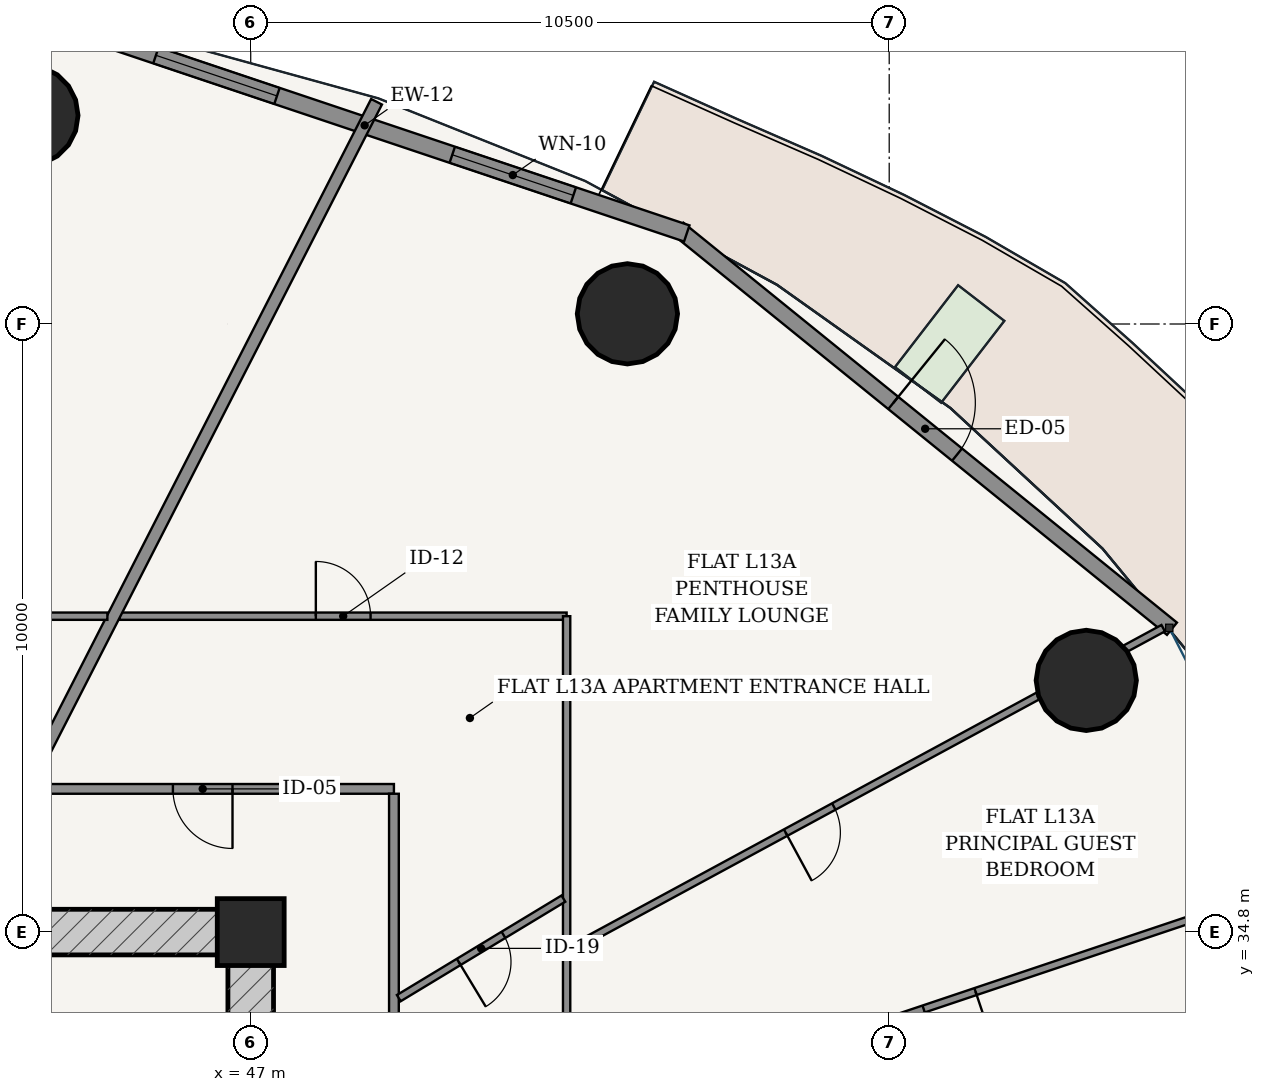
"""IFC4 building model, lengths in metres.
Left out: names, types, materials, properties, quantities, classifications, styles, units other than length and angle.
Written with IfcOpenShell. Run it as: python <this file> out.ifc"""

import sys

from ifc_helpers import new_model, si_unit, direction, frame, frame_2d, origin, origin_2d, place, context, subcontext, project, spatial, rectangle, hollow_circle, extrude, source, transform, mapped, element, fill, save


model = new_model("IFC4")
c1 = context("Model", 3, precision=1e-05, world=origin(), true_north=direction((-0.2419218956, 0.970295726276)))
c2 = subcontext(c1, "Body", "Model", "MODEL_VIEW")
j1 = project(units=[si_unit("LENGTHUNIT", "METRE"), si_unit("PLANEANGLEUNIT", "RADIAN")], contexts=[c1])
p1 = place(None, origin())
s1 = spatial("IfcSite", under=j1, at=p1, CompositionType="ELEMENT")
p2 = place(p1, origin())
s2 = spatial("IfcBuilding", under=s1, at=p2, CompositionType="ELEMENT")
p3 = place(p2, frame((0.0, 0.0, 52.8)))
s3 = spatial("IfcBuildingStorey", under=s2, at=p3, CompositionType="ELEMENT", Elevation=52.8)
p4 = place(p3, frame((47.0, 34.8, 0.0), z_axis=(0.0, 0.0, 1.0), x_axis=(1.0, 0.0, 0.0)))
e1 = element("IfcColumn", 1, at=p4, inside=s3, PredefinedType="COLUMN", context=c2, shape_type="SweptSolid", body=[
    extrude(rectangle(XDim=1.1, YDim=1.1, at=origin_2d()), origin(), (0.0, 0.0, 1.0), 3.6),
])
p5 = place(p3, frame((28.625, 34.8, 0.0), z_axis=(0.0, 0.0, 1.0), x_axis=(1.0, 0.0, 0.0)))
e2 = element("IfcWall", 2, at=p5, inside=s3, PredefinedType="SHEAR", context=c2, shape_type="SweptSolid", body=[
    extrude(rectangle(XDim=18.75, YDim=0.75, at=frame_2d((9.375, 0.0))), origin(), (0.0, 0.0, 1.0), 3.32),
])
p6 = place(p5, frame((6.887, 0.0, 0.0)))
e3 = element("IfcOpeningElement", 3, at=p6, cuts=e2, PredefinedType="OPENING", context=c2, shape_type="SweptSolid", body=[
    extrude(rectangle(XDim=0.85, YDim=2.1, at=frame_2d((0.425, 1.05))), frame((0.0, 0.385, 0.0), z_axis=(0.0, -1.0, 0.0), x_axis=(1.0, 0.0, 0.0)), (0.0, 0.0, 1.0), 0.77),
])
p7 = place(p5, frame((8.945, 0.0, 0.0)))
e4 = element("IfcOpeningElement", 4, at=p7, cuts=e2, PredefinedType="OPENING", context=c2, shape_type="SweptSolid", body=[
    extrude(rectangle(XDim=0.86, YDim=2.1, at=frame_2d((0.43, 1.05))), frame((0.0, 0.385, 0.0), z_axis=(0.0, -1.0, 0.0), x_axis=(1.0, 0.0, 0.0)), (0.0, 0.0, 1.0), 0.77),
])
p8 = place(p5, frame((11.012, 0.0, 0.0)))
e5 = element("IfcOpeningElement", 5, at=p8, cuts=e2, PredefinedType="OPENING", context=c2, shape_type="SweptSolid", body=[
    extrude(rectangle(XDim=0.85, YDim=2.1, at=frame_2d((0.425, 1.05))), frame((0.0, 0.385, 0.0), z_axis=(0.0, -1.0, 0.0), x_axis=(1.0, 0.0, 0.0)), (0.0, 0.0, 1.0), 0.77),
])
p9 = place(p3, frame((47.0, 19.175, 0.0), z_axis=(0.0, 0.0, 1.0), x_axis=(0.0, 1.0, 0.0)))
e6 = element("IfcWall", 6, at=p9, inside=s3, PredefinedType="SHEAR", context=c2, shape_type="SweptSolid", body=[
    extrude(rectangle(XDim=15.25, YDim=0.75, at=frame_2d((7.625, 0.0))), origin(), (0.0, 0.0, 1.0), 3.32),
])
p10 = place(p9, frame((9.875, 0.0, 0.0)))
e7 = element("IfcOpeningElement", 7, at=p10, cuts=e6, PredefinedType="OPENING", context=c2, shape_type="SweptSolid", body=[
    extrude(rectangle(XDim=1.5, YDim=2.2, at=frame_2d((0.75, 1.1))), frame((0.0, 0.385, 0.0), z_axis=(0.0, -1.0, 0.0), x_axis=(1.0, 0.0, 0.0)), (0.0, 0.0, 1.0), 0.77),
])
for number, where, z_axis, x_axis in (
    (8, (60.741, 38.939, 0.0), (0.0, 0.0, 1.0), (1.0, 0.0, 0.0)),
    (9, (53.195, 44.968, 0.0), (0.0, 0.0, 1.0), (1.0, 0.0, 0.0)),
    (10, (43.336, 48.23, 0.0), (0.0, 0.0, 1.0), (1.0, 0.0, 0.0)),
):
    element("IfcColumn", number, at=place(p3, frame(where, z_axis=z_axis, x_axis=x_axis)), inside=s3, PredefinedType="COLUMN", context=c2, shape_type="SweptSolid", body=[
        extrude(hollow_circle(Radius=0.825, WallThickness=0.05, at=origin_2d()), origin(), (0.0, 0.0, 1.0), 3.6),
    ])
p11 = place(p3, frame((62.15, 39.789, 0.0), z_axis=(0.0, 0.0, 1.0), x_axis=(-0.777005352078, 0.62949398952, 0.0)))
e11 = element("IfcWall", 11, at=p11, inside=s3, PredefinedType="SOLIDWALL", context=c2, shape_type="SweptSolid", body=[
    extrude(rectangle(XDim=10.447, YDim=0.26, at=frame_2d((5.223, 0.0))), origin(), (0.0, 0.0, 1.0), 3.32),
])
p12 = place(p11, frame((4.548, 0.0, 0.0)))
e12 = element("IfcOpeningElement", 12, at=p12, cuts=e11, PredefinedType="OPENING", context=c2, shape_type="SweptSolid", body=[
    extrude(rectangle(XDim=1.35, YDim=2.2, at=frame_2d((0.675, 1.1))), frame((0.0, 0.14, 0.0), z_axis=(0.0, -1.0, 0.0), x_axis=(1.0, 0.0, 0.0)), (0.0, 0.0, 1.0), 0.28),
])
p13 = place(p3, frame((54.171, 46.289, 0.0), z_axis=(0.0, 0.0, 1.0), x_axis=(-0.948041258496, 0.318147406385, 0.0)))
e13 = element("IfcWall", 13, at=p13, inside=s3, PredefinedType="SOLIDWALL", context=c2, shape_type="SweptSolid", body=[
    extrude(rectangle(XDim=11.175, YDim=0.28, at=frame_2d((5.588, 0.0))), origin(), (0.0, 0.0, 1.0), 3.32),
])
p14 = place(p13, frame((1.967, 0.0, 0.85)))
e14 = element("IfcOpeningElement", 14, at=p14, cuts=e13, PredefinedType="OPENING", context=c2, shape_type="SweptSolid", body=[
    extrude(rectangle(XDim=2.1, YDim=1.95, at=frame_2d((1.05, 0.975))), frame((0.0, 0.15, 0.0), z_axis=(0.0, -1.0, 0.0), x_axis=(1.0, 0.0, 0.0)), (0.0, 0.0, 1.0), 0.3),
])
p15 = place(p13, frame((7.108, 0.0, 0.85)))
e15 = element("IfcOpeningElement", 15, at=p15, cuts=e13, PredefinedType="OPENING", context=c2, shape_type="SweptSolid", body=[
    extrude(rectangle(XDim=2.1, YDim=1.95, at=frame_2d((1.05, 0.975))), frame((0.0, 0.15, 0.0), z_axis=(0.0, -1.0, 0.0), x_axis=(1.0, 0.0, 0.0)), (0.0, 0.0, 1.0), 0.3),
])
p16 = place(p3, frame((26.645, 37.155, 0.0), z_axis=(0.0, 0.0, 1.0), x_axis=(1.0, 0.0, 0.0)))
e16 = element("IfcWall", 16, at=p16, inside=s3, PredefinedType="PARTITIONING", context=c2, shape_type="SweptSolid", body=[
    extrude(rectangle(XDim=22.71, YDim=0.16, at=frame_2d((11.355, 0.0))), origin(), (0.0, 0.0, 1.0), 2.688),
])
p17 = place(p16, frame((19.075, 0.0, 0.0)))
e17 = element("IfcOpeningElement", 17, at=p17, cuts=e16, PredefinedType="OPENING", context=c2, shape_type="SweptSolid", body=[
    extrude(rectangle(XDim=0.98, YDim=2.2, at=frame_2d((0.49, 1.1))), frame((0.0, 0.09, 0.0), z_axis=(0.0, -1.0, 0.0), x_axis=(1.0, 0.0, 0.0)), (0.0, 0.0, 1.0), 0.18),
])
p18 = place(p16, frame((6.221, 0.0, 0.0)))
e18 = element("IfcOpeningElement", 18, at=p18, cuts=e16, PredefinedType="OPENING", context=c2, shape_type="SweptSolid", body=[
    extrude(rectangle(XDim=0.98, YDim=2.2, at=frame_2d((0.49, 1.1))), frame((0.0, 0.09, 0.0), z_axis=(0.0, -1.0, 0.0), x_axis=(1.0, 0.0, 0.0)), (0.0, 0.0, 1.0), 0.18),
])
p19 = place(p3, frame((49.355, 16.525, 0.0), z_axis=(0.0, 0.0, 1.0), x_axis=(0.0, 1.0, 0.0)))
e19 = element("IfcWall", 19, at=p19, inside=s3, PredefinedType="PARTITIONING", context=c2, shape_type="SweptSolid", body=[
    extrude(rectangle(XDim=20.55, YDim=0.16, at=frame_2d((10.275, 0.0))), origin(), (0.0, 0.0, 1.0), 2.688),
])
p20 = place(p3, frame((44.847, 39.995, 0.0), z_axis=(0.0, 0.0, 1.0), x_axis=(1.0, 0.0, 0.0)))
e20 = element("IfcWall", 20, at=p20, inside=s3, PredefinedType="PARTITIONING", context=c2, shape_type="SweptSolid", body=[
    extrude(rectangle(XDim=7.348, YDim=0.12, at=frame_2d((3.674, 0.0))), origin(), (0.0, 0.0, 1.0), 2.688),
])
p21 = place(p20, frame((3.224, 0.0, 0.0)))
e21 = element("IfcOpeningElement", 21, at=p21, cuts=e20, PredefinedType="OPENING", context=c2, shape_type="SweptSolid", body=[
    extrude(rectangle(XDim=0.9, YDim=2.15, at=frame_2d((0.45, 1.075))), frame((0.0, 0.07, 0.0), z_axis=(0.0, -1.0, 0.0), x_axis=(1.0, 0.0, 0.0)), (0.0, 0.0, 1.0), 0.14),
])
p22 = place(p3, frame((52.195, 39.995, 0.0), z_axis=(0.0, 0.0, 1.0), x_axis=(0.0, -1.0, 0.0)))
e22 = element("IfcWall", 22, at=p22, inside=s3, PredefinedType="PARTITIONING", context=c2, shape_type="SweptSolid", body=[
    extrude(rectangle(XDim=20.779, YDim=0.12, at=frame_2d((10.39, 0.0))), origin(), (0.0, 0.0, 1.0), 2.688),
])
p23 = place(p22, frame((13.944, 0.0, 0.0)))
e23 = element("IfcOpeningElement", 23, at=p23, cuts=e22, PredefinedType="OPENING", context=c2, shape_type="SweptSolid", body=[
    extrude(rectangle(XDim=0.9, YDim=2.15, at=frame_2d((0.45, 1.075))), frame((0.0, 0.07, 0.0), z_axis=(0.0, -1.0, 0.0), x_axis=(1.0, 0.0, 0.0)), (0.0, 0.0, 1.0), 0.14),
])
p24 = place(p22, frame((17.655, 0.0, 0.0)))
e24 = element("IfcOpeningElement", 24, at=p24, cuts=e22, PredefinedType="OPENING", context=c2, shape_type="SweptSolid", body=[
    extrude(rectangle(XDim=0.9, YDim=2.15, at=frame_2d((0.45, 1.075))), frame((0.0, 0.07, 0.0), z_axis=(0.0, -1.0, 0.0), x_axis=(1.0, 0.0, 0.0)), (0.0, 0.0, 1.0), 0.14),
])
p25 = place(p3, frame((52.254, 31.584, 0.0), z_axis=(0.0, 0.0, 1.0), x_axis=(0.948022802246, 0.318202398516, 0.0)))
e25 = element("IfcWall", 25, at=p25, inside=s3, PredefinedType="PARTITIONING", context=c2, shape_type="SweptSolid", body=[
    extrude(rectangle(XDim=13.163, YDim=0.12, at=frame_2d((6.582, 0.0))), origin(), (0.0, 0.0, 1.0), 2.762),
])
p26 = place(p25, frame((6.131, 0.0, 0.0)))
e26 = element("IfcOpeningElement", 26, at=p26, cuts=e25, PredefinedType="OPENING", context=c2, shape_type="SweptSolid", body=[
    extrude(rectangle(XDim=0.9, YDim=2.15, at=frame_2d((0.45, 1.075))), frame((0.0, 0.07, 0.0), z_axis=(0.0, -1.0, 0.0), x_axis=(1.0, 0.0, 0.0)), (0.0, 0.0, 1.0), 0.14),
])
p27 = place(p3, frame((52.25, 34.515, 0.0), z_axis=(0.0, 0.0, 1.0), x_axis=(0.879370672984, 0.476137815654, 0.0)))
e27 = element("IfcWall", 27, at=p27, inside=s3, PredefinedType="PARTITIONING", context=c2, shape_type="SweptSolid", body=[
    extrude(rectangle(XDim=11.094, YDim=0.12, at=frame_2d((5.547, 0.0))), origin(), (0.0, 0.0, 1.0), 2.688),
])
p28 = place(p27, frame((4.034, 0.0, 0.0)))
e28 = element("IfcOpeningElement", 28, at=p28, cuts=e27, PredefinedType="OPENING", context=c2, shape_type="SweptSolid", body=[
    extrude(rectangle(XDim=0.9, YDim=2.15, at=frame_2d((0.45, 1.075))), frame((0.0, 0.07, 0.0), z_axis=(0.0, -1.0, 0.0), x_axis=(1.0, 0.0, 0.0)), (0.0, 0.0, 1.0), 0.14),
])
p29 = place(p3, frame((49.435, 33.714, 0.0), z_axis=(0.0, 0.0, 1.0), x_axis=(0.855724035959, 0.517432482824, 0.0)))
e29 = element("IfcWall", 29, at=p29, inside=s3, PredefinedType="PARTITIONING", context=c2, shape_type="SweptSolid", body=[
    extrude(rectangle(XDim=3.163, YDim=0.12, at=frame_2d((1.582, 0.0))), origin(), (0.0, 0.0, 1.0), 3.32),
])
p30 = place(p29, frame((1.152, 0.0, 0.0)))
e30 = element("IfcOpeningElement", 30, at=p30, cuts=e29, PredefinedType="OPENING", context=c2, shape_type="SweptSolid", body=[
    extrude(rectangle(XDim=0.86, YDim=2.15, at=frame_2d((0.43, 1.075))), frame((0.0, 0.07, 0.0), z_axis=(0.0, -1.0, 0.0), x_axis=(1.0, 0.0, 0.0)), (0.0, 0.0, 1.0), 0.14),
])
p31 = place(p3, frame((43.335, 37.237, 0.0), z_axis=(0.0, 0.0, 1.0), x_axis=(0.455148959499, 0.890415310216, 0.0)))
e31 = element("IfcWall", 31, at=p31, inside=s3, PredefinedType="PARTITIONING", context=c2, shape_type="SweptSolid", body=[
    extrude(rectangle(XDim=12.598, YDim=0.2, at=frame_2d((6.299, 0.0))), origin(), (0.0, 0.0, 1.0), 2.762),
])
p32 = place(p3, frame((23.805, 39.995, 0.0), z_axis=(0.0, 0.0, 1.0), x_axis=(1.0, 0.0, 0.0)))
e32 = element("IfcWall", 32, at=p32, inside=s3, PredefinedType="PARTITIONING", context=c2, shape_type="SweptSolid", body=[
    extrude(rectangle(XDim=20.838, YDim=0.12, at=frame_2d((10.419, 0.0))), origin(), (0.0, 0.0, 1.0), 2.688),
])
p33 = place(p32, frame((11.931, 0.0, 0.0)))
e33 = element("IfcOpeningElement", 33, at=p33, cuts=e32, PredefinedType="OPENING", context=c2, shape_type="SweptSolid", body=[
    extrude(rectangle(XDim=0.9, YDim=2.15, at=frame_2d((0.45, 1.075))), frame((0.0, 0.07, 0.0), z_axis=(0.0, -1.0, 0.0), x_axis=(1.0, 0.0, 0.0)), (0.0, 0.0, 1.0), 0.14),
])
m1 = source(origin(), c2, "Body", "SweptSolid", [
    extrude(rectangle(XDim=1.35, YDim=2.2, at=frame_2d((0.675, 1.1))), frame((0.0, 0.025, 0.0), z_axis=(0.0, -1.0, 0.0), x_axis=(1.0, 0.0, 0.0)), (0.0, 0.0, 1.0), 0.05),
])
p34 = place(p12, frame((1.35, 0.0, 0.0), z_axis=(0.0, 0.0, 1.0), x_axis=(-1.0, 0.0, 0.0)))
e34 = element("IfcDoor", 34, at=p34, inside=s3, OperationType="SINGLE_SWING_LEFT", PredefinedType="DOOR", context=c2, shape_type="MappedRepresentation", body=[
    mapped(m1, transform((0.0, 0.0, 0.0), scale=1.0)),
])
fill(e12, e34)
m2 = source(origin(), c2, "Body", "SweptSolid", [
    extrude(rectangle(XDim=2.1, YDim=1.95, at=frame_2d((1.05, 0.975))), frame((0.0, 0.03, 0.0), z_axis=(0.0, -1.0, 0.0), x_axis=(1.0, 0.0, 0.0)), (0.0, 0.0, 1.0), 0.06),
])
p35 = place(p14, origin())
e35 = element("IfcWindow", 35, at=p35, inside=s3, PartitioningType="SINGLE_PANEL", PredefinedType="WINDOW", context=c2, shape_type="MappedRepresentation", body=[
    mapped(m2, transform((0.0, 0.0, 0.0), scale=1.0)),
])
fill(e14, e35)
p36 = place(p15, origin())
e36 = element("IfcWindow", 36, at=p36, inside=s3, PartitioningType="SINGLE_PANEL", PredefinedType="WINDOW", context=c2, shape_type="MappedRepresentation", body=[
    mapped(m2, transform((0.0, 0.0, 0.0), scale=1.0)),
])
fill(e15, e36)
m3 = source(origin(), c2, "Body", "SweptSolid", [
    extrude(rectangle(XDim=0.98, YDim=2.2, at=frame_2d((0.49, 1.1))), frame((0.0, 0.025, 0.0), z_axis=(0.0, -1.0, 0.0), x_axis=(1.0, 0.0, 0.0)), (0.0, 0.0, 1.0), 0.05),
])
p37 = place(p17, frame((0.98, 0.0, 0.0), z_axis=(0.0, 0.0, 1.0), x_axis=(-1.0, 0.0, 0.0)))
e37 = element("IfcDoor", 37, at=p37, inside=s3, OperationType="SINGLE_SWING_LEFT", PredefinedType="DOOR", context=c2, shape_type="MappedRepresentation", body=[
    mapped(m3, transform((0.0, 0.0, 0.0), scale=1.0)),
])
fill(e17, e37)
m4 = source(origin(), c2, "Body", "SweptSolid", [
    extrude(rectangle(XDim=0.86, YDim=2.15, at=frame_2d((0.43, 1.075))), frame((0.0, 0.025, 0.0), z_axis=(0.0, -1.0, 0.0), x_axis=(1.0, 0.0, 0.0)), (0.0, 0.0, 1.0), 0.05),
])
p38 = place(p30, frame((0.86, 0.0, 0.0), z_axis=(0.0, 0.0, 1.0), x_axis=(-1.0, 0.0, 0.0)))
e38 = element("IfcDoor", 38, at=p38, inside=s3, OperationType="SINGLE_SWING_RIGHT", PredefinedType="DOOR", context=c2, shape_type="MappedRepresentation", body=[
    mapped(m4, transform((0.0, 0.0, 0.0), scale=1.0)),
])
fill(e30, e38)
m5 = source(origin(), c2, "Body", "SweptSolid", [
    extrude(rectangle(XDim=0.9, YDim=2.15, at=frame_2d((0.45, 1.075))), frame((0.0, 0.025, 0.0), z_axis=(0.0, -1.0, 0.0), x_axis=(1.0, 0.0, 0.0)), (0.0, 0.0, 1.0), 0.05),
])
p39 = place(p21, origin())
e39 = element("IfcDoor", 39, at=p39, inside=s3, OperationType="SINGLE_SWING_LEFT", PredefinedType="DOOR", context=c2, shape_type="MappedRepresentation", body=[
    mapped(m5, transform((0.0, 0.0, 0.0), scale=1.0)),
])
fill(e21, e39)
p40 = place(p28, frame((0.9, 0.0, 0.0), z_axis=(0.0, 0.0, 1.0), x_axis=(-1.0, 0.0, 0.0)))
e40 = element("IfcDoor", 40, at=p40, inside=s3, OperationType="SINGLE_SWING_RIGHT", PredefinedType="DOOR", context=c2, shape_type="MappedRepresentation", body=[
    mapped(m5, transform((0.0, 0.0, 0.0), scale=1.0)),
])
fill(e28, e40)
p41 = place(p26, frame((0.9, 0.0, 0.0), z_axis=(0.0, 0.0, 1.0), x_axis=(-1.0, 0.0, 0.0)))
e41 = element("IfcDoor", 41, at=p41, inside=s3, OperationType="SINGLE_SWING_LEFT", PredefinedType="DOOR", context=c2, shape_type="MappedRepresentation", body=[
    mapped(m5, transform((0.0, 0.0, 0.0), scale=1.0)),
])
fill(e26, e41)
save(model, sys.argv[1])
